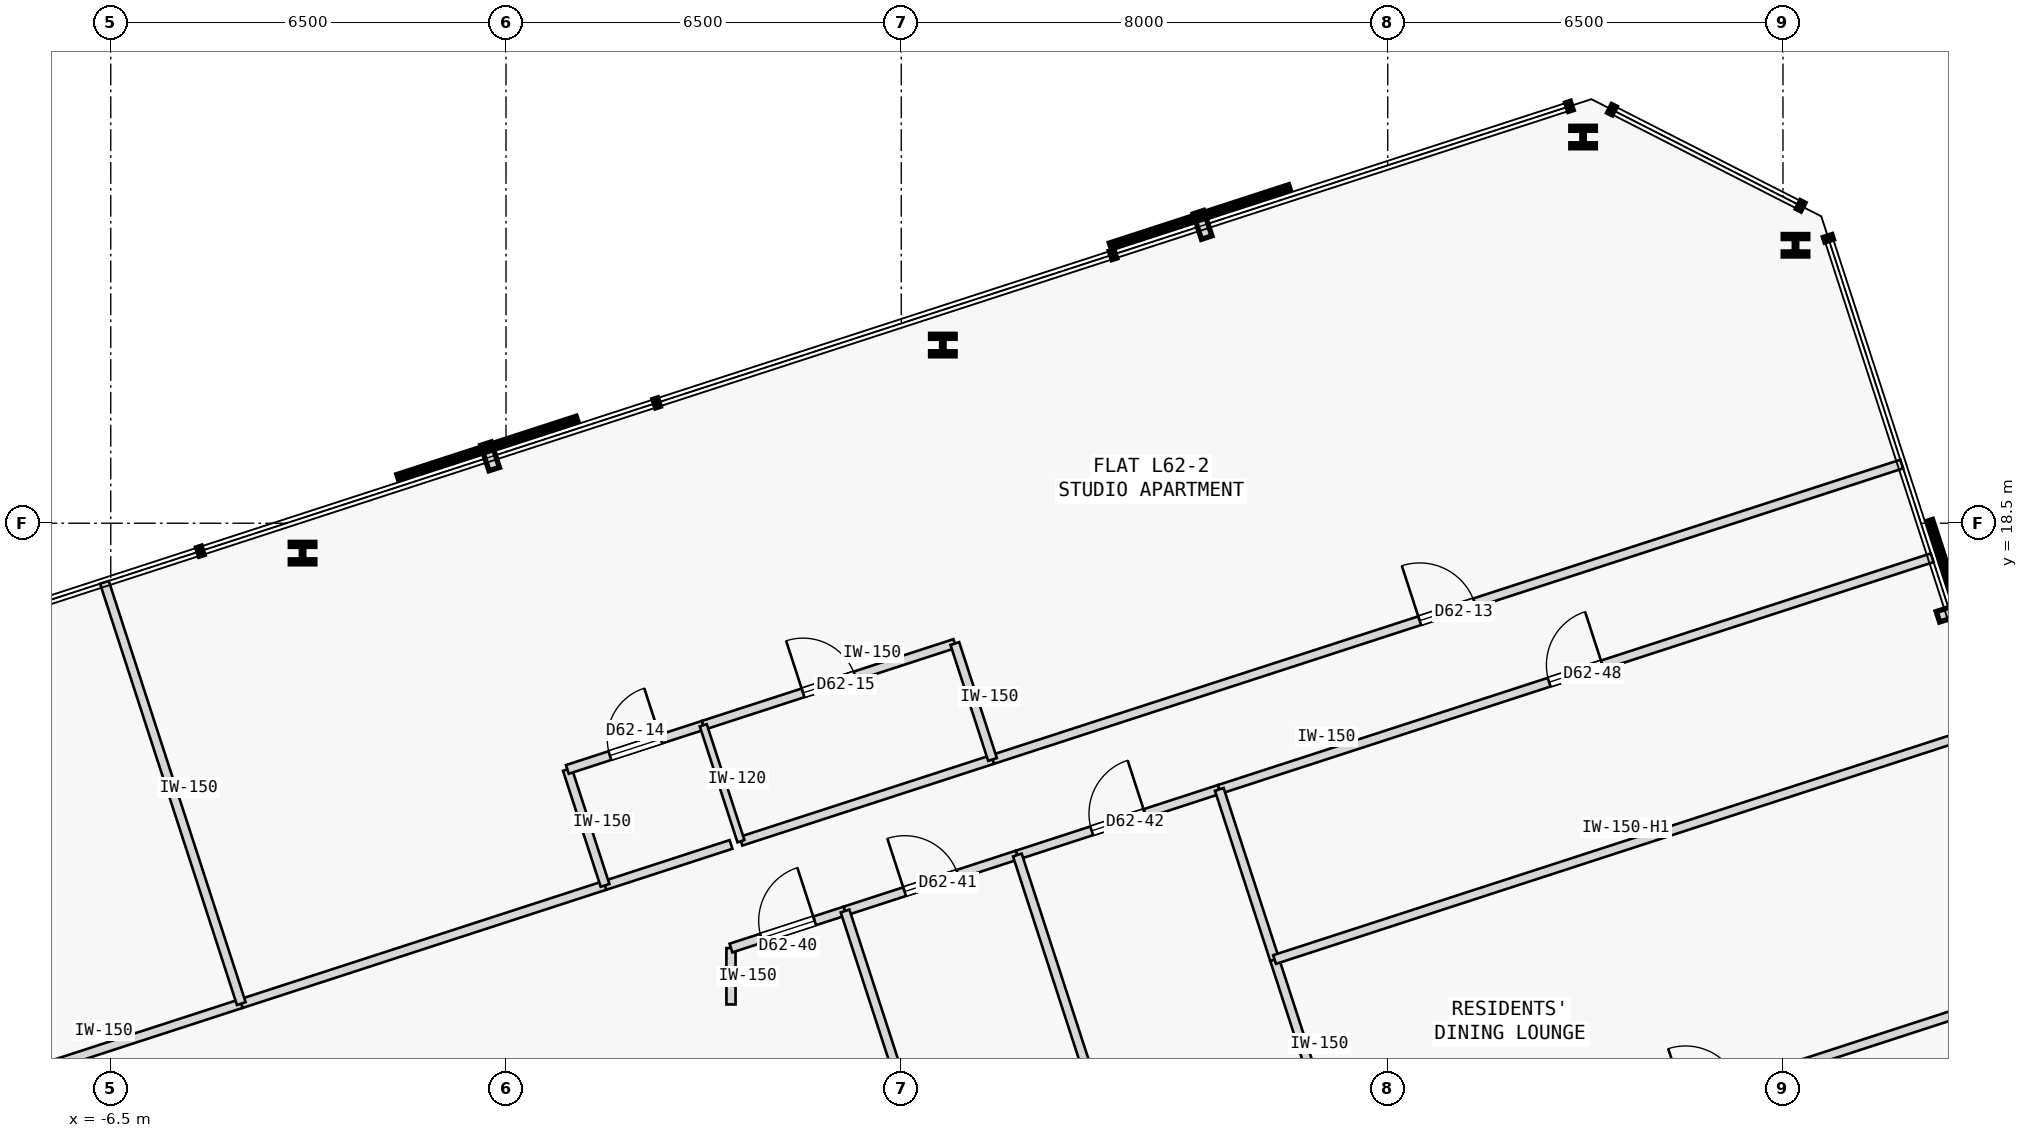
"""IFC4 building model, lengths in metres.
Left out: names, types, materials, properties, quantities, classifications, styles, units other than length and angle.
Written with IfcOpenShell. Run it as: python <this file> out.ifc"""

import sys

from ifc_helpers import new_model, si_unit, direction, frame, frame_2d, origin, origin_2d, place, context, subcontext, project, spatial, rectangle, i_section, extrude, element, fill, save


model = new_model("IFC4")
c1 = context("Model", 3, precision=1e-05, world=origin(), true_north=direction((0.0, 1.0)))
c2 = subcontext(c1, "Body", "Model", "MODEL_VIEW")
j1 = project(units=[si_unit("LENGTHUNIT", "METRE"), si_unit("PLANEANGLEUNIT", "RADIAN")], contexts=[c1])
p1 = place(None, origin())
s1 = spatial("IfcSite", under=j1, at=p1, CompositionType="ELEMENT")
p2 = place(p1, origin())
s2 = spatial("IfcBuilding", under=s1, at=p2, CompositionType="ELEMENT")
p3 = place(p2, frame((0.0, 0.0, 234.35)))
s3 = spatial("IfcBuildingStorey", under=s2, at=p3, CompositionType="ELEMENT", Elevation=234.35)
for number, where, z_axis, x_axis in (
    (1, (21.206, 23.071, 0.0), (0.0, 0.0, 1.0), (1.0, 0.0, 0.0)),
    (2, (17.713, 24.851, 0.0), (0.0, 0.0, 1.0), (1.0, 0.0, 0.0)),
    (3, (7.184, 21.43, 0.0), (0.0, 0.0, 1.0), (1.0, 0.0, 0.0)),
    (4, (-3.346, 18.009, 0.0), (0.0, 0.0, 1.0), (1.0, 0.0, 0.0)),
):
    element("IfcColumn", number, at=place(p3, frame(where, z_axis=z_axis, x_axis=x_axis)), inside=s3, PredefinedType="COLUMN", context=c2, shape_type="SweptSolid", body=[
        extrude(i_section(OverallWidth=0.405, OverallDepth=0.355, WebThickness=0.042, FlangeThickness=0.068, FilletRadius=0.015, at=origin_2d()), origin(), (0.0, 0.0, 1.0), 3.35),
    ])
p4 = place(p3, frame((-22.586, 4.677, 0.0), z_axis=(0.0, 0.0, 1.0), x_axis=(0.951057743275, 0.309013218095, 0.0)))
e5 = element("IfcWall", 5, at=p4, inside=s3, PredefinedType="PARTITIONING", context=c2, shape_type="SweptSolid", body=[
    extrude(rectangle(XDim=19.171, YDim=0.15, at=frame_2d((9.585, 0.0))), origin(), (0.0, 0.0, 1.0), 3.125),
])
p5 = place(p4, frame((9.111, 0.0, 0.0)))
e6 = element("IfcOpeningElement", 6, at=p5, cuts=e5, PredefinedType="OPENING", context=c2, shape_type="SweptSolid", body=[
    extrude(rectangle(XDim=0.95, YDim=2.15, at=frame_2d((0.475, 1.075))), frame((0.0, 0.085, 0.0), z_axis=(0.0, -1.0, 0.0), x_axis=(1.0, 0.0, 0.0)), (0.0, 0.0, 1.0), 0.17),
])
p6 = place(p3, frame((-4.354, 10.601, 0.0), z_axis=(0.0, 0.0, 1.0), x_axis=(0.951050896078, 0.30903429109, 0.0)))
e7 = element("IfcWall", 7, at=p6, inside=s3, PredefinedType="PARTITIONING", context=c2, shape_type="SweptSolid", body=[
    extrude(rectangle(XDim=6.29, YDim=0.15, at=frame_2d((3.145, 0.0))), origin(), (0.0, 0.0, 1.0), 3.125),
])
p7 = place(p3, frame((8.001, 14.615, 0.0), z_axis=(0.0, 0.0, 1.0), x_axis=(0.951056661035, 0.309016548911, 0.0)))
e8 = element("IfcWall", 8, at=p7, inside=s3, PredefinedType="PARTITIONING", context=c2, shape_type="SweptSolid", body=[
    extrude(rectangle(XDim=15.722, YDim=0.15, at=frame_2d((7.861, 0.0))), origin(), (0.0, 0.0, 1.0), 3.125),
])
p8 = place(p7, frame((7.386, 0.0, 0.0)))
e9 = element("IfcOpeningElement", 9, at=p8, cuts=e8, PredefinedType="OPENING", context=c2, shape_type="SweptSolid", body=[
    extrude(rectangle(XDim=0.95, YDim=2.15, at=frame_2d((0.475, 1.075))), frame((0.0, 0.085, 0.0), z_axis=(0.0, -1.0, 0.0), x_axis=(1.0, 0.0, 0.0)), (0.0, 0.0, 1.0), 0.17),
])
p9 = place(p3, frame((1.629, 12.544, 0.0), z_axis=(0.0, 0.0, 1.0), x_axis=(0.951087596826, 0.308921321963, 0.0)))
e10 = element("IfcWall", 10, at=p9, inside=s3, PredefinedType="PARTITIONING", context=c2, shape_type="SweptSolid", body=[
    extrude(rectangle(XDim=2.178, YDim=0.15, at=frame_2d((1.089, 0.0))), origin(), (0.0, 0.0, 1.0), 3.125),
])
p10 = place(p3, frame((3.864, 13.271, 0.0), z_axis=(0.0, 0.0, 1.0), x_axis=(0.951052627573, 0.309028962374, 0.0)))
e11 = element("IfcWall", 11, at=p10, inside=s3, PredefinedType="PARTITIONING", context=c2, shape_type="SweptSolid", body=[
    extrude(rectangle(XDim=4.35, YDim=0.15, at=frame_2d((2.175, 0.0))), origin(), (0.0, 0.0, 1.0), 3.125),
])
p11 = place(p3, frame((3.7, 10.587, 0.0), z_axis=(0.0, 0.0, 1.0), x_axis=(-0.000789889169, 0.999999688038, 0.0)))
e12 = element("IfcWall", 12, at=p11, inside=s3, PredefinedType="PARTITIONING", context=c2, shape_type="SweptSolid", body=[
    extrude(rectangle(XDim=0.927, YDim=0.15, at=frame_2d((0.464, 0.0))), origin(), (0.0, 0.0, 1.0), 3.125),
])
p12 = place(p3, frame((3.699, 11.514, 0.0), z_axis=(0.0, 0.0, 1.0), x_axis=(0.951068617763, 0.308979747405, 0.0)))
e13 = element("IfcWall", 13, at=p12, inside=s3, PredefinedType="PARTITIONING", context=c2, shape_type="SweptSolid", body=[
    extrude(rectangle(XDim=1.973, YDim=0.15, at=frame_2d((0.986, 0.0))), origin(), (0.0, 0.0, 1.0), 3.125),
])
p13 = place(p12, frame((0.527, 0.0, 0.0)))
e14 = element("IfcOpeningElement", 14, at=p13, cuts=e13, PredefinedType="OPENING", context=c2, shape_type="SweptSolid", body=[
    extrude(rectangle(XDim=0.92, YDim=2.15, at=frame_2d((0.46, 1.075))), frame((0.0, 0.085, 0.0), z_axis=(0.0, -1.0, 0.0), x_axis=(1.0, 0.0, 0.0)), (0.0, 0.0, 1.0), 0.17),
])
p14 = place(p3, frame((5.576, 12.124, 0.0), z_axis=(0.0, 0.0, 1.0), x_axis=(0.951049123732, 0.309039745419, 0.0)))
e15 = element("IfcWall", 15, at=p14, inside=s3, PredefinedType="PARTITIONING", context=c2, shape_type="SweptSolid", body=[
    extrude(rectangle(XDim=2.979, YDim=0.15, at=frame_2d((1.49, 0.0))), origin(), (0.0, 0.0, 1.0), 3.125),
])
p15 = place(p14, frame((1.03, 0.0, 0.0)))
e16 = element("IfcOpeningElement", 16, at=p15, cuts=e15, PredefinedType="OPENING", context=c2, shape_type="SweptSolid", body=[
    extrude(rectangle(XDim=0.92, YDim=2.15, at=frame_2d((0.46, 1.075))), frame((0.0, 0.085, 0.0), z_axis=(0.0, -1.0, 0.0), x_axis=(1.0, 0.0, 0.0)), (0.0, 0.0, 1.0), 0.17),
])
p16 = place(p3, frame((8.409, 13.044, 0.0), z_axis=(0.0, 0.0, 1.0), x_axis=(0.951054104561, 0.309024416831, 0.0)))
e17 = element("IfcWall", 17, at=p16, inside=s3, PredefinedType="PARTITIONING", context=c2, shape_type="SweptSolid", body=[
    extrude(rectangle(XDim=3.492, YDim=0.15, at=frame_2d((1.746, 0.0))), origin(), (0.0, 0.0, 1.0), 3.125),
])
p17 = place(p16, frame((1.286, 0.0, 0.0)))
e18 = element("IfcOpeningElement", 18, at=p17, cuts=e17, PredefinedType="OPENING", context=c2, shape_type="SweptSolid", body=[
    extrude(rectangle(XDim=0.92, YDim=2.15, at=frame_2d((0.46, 1.075))), frame((0.0, 0.085, 0.0), z_axis=(0.0, -1.0, 0.0), x_axis=(1.0, 0.0, 0.0)), (0.0, 0.0, 1.0), 0.17),
])
p18 = place(p3, frame((11.73, 14.123, 0.0), z_axis=(0.0, 0.0, 1.0), x_axis=(0.951060263663, 0.309005460926, 0.0)))
e19 = element("IfcWall", 19, at=p18, inside=s3, PredefinedType="PARTITIONING", context=c2, shape_type="SweptSolid", body=[
    extrude(rectangle(XDim=12.327, YDim=0.15, at=frame_2d((6.164, 0.0))), origin(), (0.0, 0.0, 1.0), 3.125),
])
p19 = place(p18, frame((5.704, 0.0, 0.0)))
e20 = element("IfcOpeningElement", 20, at=p19, cuts=e19, PredefinedType="OPENING", context=c2, shape_type="SweptSolid", body=[
    extrude(rectangle(XDim=0.92, YDim=2.15, at=frame_2d((0.46, 1.075))), frame((0.0, 0.085, 0.0), z_axis=(0.0, -1.0, 0.0), x_axis=(1.0, 0.0, 0.0)), (0.0, 0.0, 1.0), 0.17),
])
p20 = place(p3, frame((-4.354, 10.601, 0.0), z_axis=(0.0, 0.0, 1.0), x_axis=(-0.308989064099, 0.951065590939, 0.0)))
e21 = element("IfcWall", 21, at=p20, inside=s3, PredefinedType="PARTITIONING", context=c2, shape_type="SweptSolid", body=[
    extrude(rectangle(XDim=7.284, YDim=0.15, at=frame_2d((3.642, 0.0))), origin(), (0.0, 0.0, 1.0), 3.125),
])
p21 = place(p3, frame((1.629, 12.544, 0.0), z_axis=(0.0, 0.0, 1.0), x_axis=(-0.309022749039, 0.951054646472, 0.0)))
e22 = element("IfcWall", 22, at=p21, inside=s3, PredefinedType="PARTITIONING", context=c2, shape_type="SweptSolid", body=[
    extrude(rectangle(XDim=2.005, YDim=0.15, at=frame_2d((1.002, 0.0))), origin(), (0.0, 0.0, 1.0), 3.125),
])
p22 = place(p3, frame((1.009, 14.451, 0.0), z_axis=(0.0, 0.0, 1.0), x_axis=(0.951076048914, 0.308956872689, 0.0)))
e23 = element("IfcWall", 23, at=p22, inside=s3, PredefinedType="PARTITIONING", context=c2, shape_type="SweptSolid", body=[
    extrude(rectangle(XDim=2.35, YDim=0.15, at=frame_2d((1.175, 0.0))), origin(), (0.0, 0.0, 1.0), 3.125),
])
p23 = place(p22, frame((0.735, 0.0, 0.0)))
e24 = element("IfcOpeningElement", 24, at=p23, cuts=e23, PredefinedType="OPENING", context=c2, shape_type="SweptSolid", body=[
    extrude(rectangle(XDim=0.88, YDim=2.15, at=frame_2d((0.44, 1.075))), frame((0.0, 0.085, 0.0), z_axis=(0.0, -1.0, 0.0), x_axis=(1.0, 0.0, 0.0)), (0.0, 0.0, 1.0), 0.17),
])
p24 = place(p3, frame((3.244, 15.177, 0.0), z_axis=(0.0, 0.0, 1.0), x_axis=(0.951052627573, 0.309028962374, 0.0)))
e25 = element("IfcWall", 25, at=p24, inside=s3, PredefinedType="PARTITIONING", context=c2, shape_type="SweptSolid", body=[
    extrude(rectangle(XDim=4.35, YDim=0.15, at=frame_2d((2.175, 0.0))), origin(), (0.0, 0.0, 1.0), 3.125),
])
p25 = place(p24, frame((1.725, 0.0, 0.0)))
e26 = element("IfcOpeningElement", 26, at=p25, cuts=e25, PredefinedType="OPENING", context=c2, shape_type="SweptSolid", body=[
    extrude(rectangle(XDim=0.9, YDim=2.15, at=frame_2d((0.45, 1.075))), frame((0.0, 0.085, 0.0), z_axis=(0.0, -1.0, 0.0), x_axis=(1.0, 0.0, 0.0)), (0.0, 0.0, 1.0), 0.17),
])
p26 = place(p3, frame((8.001, 14.615, 0.0), z_axis=(0.0, 0.0, 1.0), x_axis=(-0.309022749039, 0.951054646472, 0.0)))
e27 = element("IfcWall", 27, at=p26, inside=s3, PredefinedType="PARTITIONING", context=c2, shape_type="SweptSolid", body=[
    extrude(rectangle(XDim=2.005, YDim=0.15, at=frame_2d((1.002, 0.0))), origin(), (0.0, 0.0, 1.0), 3.125),
])
p27 = place(p3, frame((3.864, 13.271, 0.0), z_axis=(0.0, 0.0, 1.0), x_axis=(-0.309022749039, 0.951054646472, 0.0)))
e28 = element("IfcWall", 28, at=p27, inside=s3, PredefinedType="PARTITIONING", context=c2, shape_type="SweptSolid", body=[
    extrude(rectangle(XDim=2.005, YDim=0.12, at=frame_2d((1.002, 0.0))), origin(), (0.0, 0.0, 1.0), 3.125),
])
p28 = place(p3, frame((7.696, 5.599, 0.0), z_axis=(0.0, 0.0, 1.0), x_axis=(-0.309022497646, 0.951054728157, 0.0)))
e29 = element("IfcWall", 29, at=p28, inside=s3, PredefinedType="PARTITIONING", context=c2, shape_type="SweptSolid", body=[
    extrude(rectangle(XDim=6.86, YDim=0.15, at=frame_2d((3.43, 0.0))), origin(), (0.0, 0.0, 1.0), 3.125),
])
p29 = place(p3, frame((10.828, 5.6, 0.0), z_axis=(0.0, 0.0, 1.0), x_axis=(-0.30901342663, 0.951057675519, 0.0)))
e30 = element("IfcWall", 30, at=p29, inside=s3, PredefinedType="PARTITIONING", context=c2, shape_type="SweptSolid", body=[
    extrude(rectangle(XDim=7.827, YDim=0.15, at=frame_2d((3.914, 0.0))), origin(), (0.0, 0.0, 1.0), 3.125),
])
p30 = place(p3, frame((13.973, 7.221, 0.0), z_axis=(0.0, 0.0, 1.0), x_axis=(-0.309038735568, 0.951049451879, 0.0)))
e31 = element("IfcWall", 31, at=p30, inside=s3, PredefinedType="PARTITIONING", context=c2, shape_type="SweptSolid", body=[
    extrude(rectangle(XDim=4.315, YDim=0.15, at=frame_2d((2.157, 0.0))), origin(), (0.0, 0.0, 1.0), 3.125),
])
p31 = place(p3, frame((12.639, 11.325, 0.0), z_axis=(0.0, 0.0, 1.0), x_axis=(-0.309024151982, 0.951054190618, 0.0)))
e32 = element("IfcWall", 32, at=p31, inside=s3, PredefinedType="PARTITIONING", context=c2, shape_type="SweptSolid", body=[
    extrude(rectangle(XDim=2.942, YDim=0.15, at=frame_2d((1.471, 0.0))), origin(), (0.0, 0.0, 1.0), 3.125),
])
p32 = place(p3, frame((13.973, 7.221, 0.0), z_axis=(0.0, 0.0, 1.0), x_axis=(0.951058372493, 0.309011281527, 0.0)))
e33 = element("IfcWall", 33, at=p32, inside=s3, PredefinedType="PARTITIONING", context=c2, shape_type="SweptSolid", body=[
    extrude(rectangle(XDim=12.327, YDim=0.15, at=frame_2d((6.163, 0.0))), origin(), (0.0, 0.0, 1.0), 3.125),
])
p33 = place(p32, frame((5.704, 0.0, 0.0)))
e34 = element("IfcOpeningElement", 34, at=p33, cuts=e33, PredefinedType="OPENING", context=c2, shape_type="SweptSolid", body=[
    extrude(rectangle(XDim=0.92, YDim=2.15, at=frame_2d((0.46, 1.075))), frame((0.0, 0.085, 0.0), z_axis=(0.0, -1.0, 0.0), x_axis=(1.0, 0.0, 0.0)), (0.0, 0.0, 1.0), 0.17),
])
p34 = place(p3, frame((12.639, 11.325, 0.0), z_axis=(0.0, 0.0, 1.0), x_axis=(0.951054443032, 0.309023375149, 0.0)))
e35 = element("IfcWall", 35, at=p34, inside=s3, PredefinedType="PARTITIONING", context=c2, shape_type="SweptSolid", body=[
    extrude(rectangle(XDim=12.327, YDim=0.15, at=frame_2d((6.164, 0.0))), origin(), (0.0, 0.0, 1.0), 2.675),
])
p35 = place(p8, origin())
e36 = element("IfcDoor", 36, at=p35, inside=s3, OperationType="SINGLE_SWING_LEFT", PredefinedType="DOOR", context=c2, shape_type="SweptSolid", body=[
    extrude(rectangle(XDim=0.95, YDim=2.15, at=frame_2d((0.475, 1.075))), frame((0.0, 0.025, 0.0), z_axis=(0.0, -1.0, 0.0), x_axis=(1.0, 0.0, 0.0)), (0.0, 0.0, 1.0), 0.05),
])
fill(e9, e36)
p36 = place(p23, origin())
e37 = element("IfcDoor", 37, at=p36, inside=s3, OperationType="SINGLE_SWING_RIGHT", PredefinedType="DOOR", context=c2, shape_type="SweptSolid", body=[
    extrude(rectangle(XDim=0.88, YDim=2.15, at=frame_2d((0.44, 1.075))), frame((0.0, 0.025, 0.0), z_axis=(0.0, -1.0, 0.0), x_axis=(1.0, 0.0, 0.0)), (0.0, 0.0, 1.0), 0.05),
])
fill(e24, e37)
p37 = place(p25, origin())
e38 = element("IfcDoor", 38, at=p37, inside=s3, OperationType="SINGLE_SWING_LEFT", PredefinedType="DOOR", context=c2, shape_type="SweptSolid", body=[
    extrude(rectangle(XDim=0.9, YDim=2.15, at=frame_2d((0.45, 1.075))), frame((0.0, 0.025, 0.0), z_axis=(0.0, -1.0, 0.0), x_axis=(1.0, 0.0, 0.0)), (0.0, 0.0, 1.0), 0.05),
])
fill(e26, e38)
p38 = place(p13, origin())
e39 = element("IfcDoor", 39, at=p38, inside=s3, OperationType="SINGLE_SWING_RIGHT", PredefinedType="DOOR", context=c2, shape_type="SweptSolid", body=[
    extrude(rectangle(XDim=0.92, YDim=2.15, at=frame_2d((0.46, 1.075))), frame((0.0, 0.025, 0.0), z_axis=(0.0, -1.0, 0.0), x_axis=(1.0, 0.0, 0.0)), (0.0, 0.0, 1.0), 0.05),
])
fill(e14, e39)
p39 = place(p15, origin())
e40 = element("IfcDoor", 40, at=p39, inside=s3, OperationType="SINGLE_SWING_LEFT", PredefinedType="DOOR", context=c2, shape_type="SweptSolid", body=[
    extrude(rectangle(XDim=0.92, YDim=2.15, at=frame_2d((0.46, 1.075))), frame((0.0, 0.025, 0.0), z_axis=(0.0, -1.0, 0.0), x_axis=(1.0, 0.0, 0.0)), (0.0, 0.0, 1.0), 0.05),
])
fill(e16, e40)
p40 = place(p17, origin())
e41 = element("IfcDoor", 41, at=p40, inside=s3, OperationType="SINGLE_SWING_RIGHT", PredefinedType="DOOR", context=c2, shape_type="SweptSolid", body=[
    extrude(rectangle(XDim=0.92, YDim=2.15, at=frame_2d((0.46, 1.075))), frame((0.0, 0.025, 0.0), z_axis=(0.0, -1.0, 0.0), x_axis=(1.0, 0.0, 0.0)), (0.0, 0.0, 1.0), 0.05),
])
fill(e18, e41)
p41 = place(p19, origin())
e42 = element("IfcDoor", 42, at=p41, inside=s3, OperationType="SINGLE_SWING_RIGHT", PredefinedType="DOOR", context=c2, shape_type="SweptSolid", body=[
    extrude(rectangle(XDim=0.92, YDim=2.15, at=frame_2d((0.46, 1.075))), frame((0.0, 0.025, 0.0), z_axis=(0.0, -1.0, 0.0), x_axis=(1.0, 0.0, 0.0)), (0.0, 0.0, 1.0), 0.05),
])
fill(e20, e42)
save(model, sys.argv[1])
